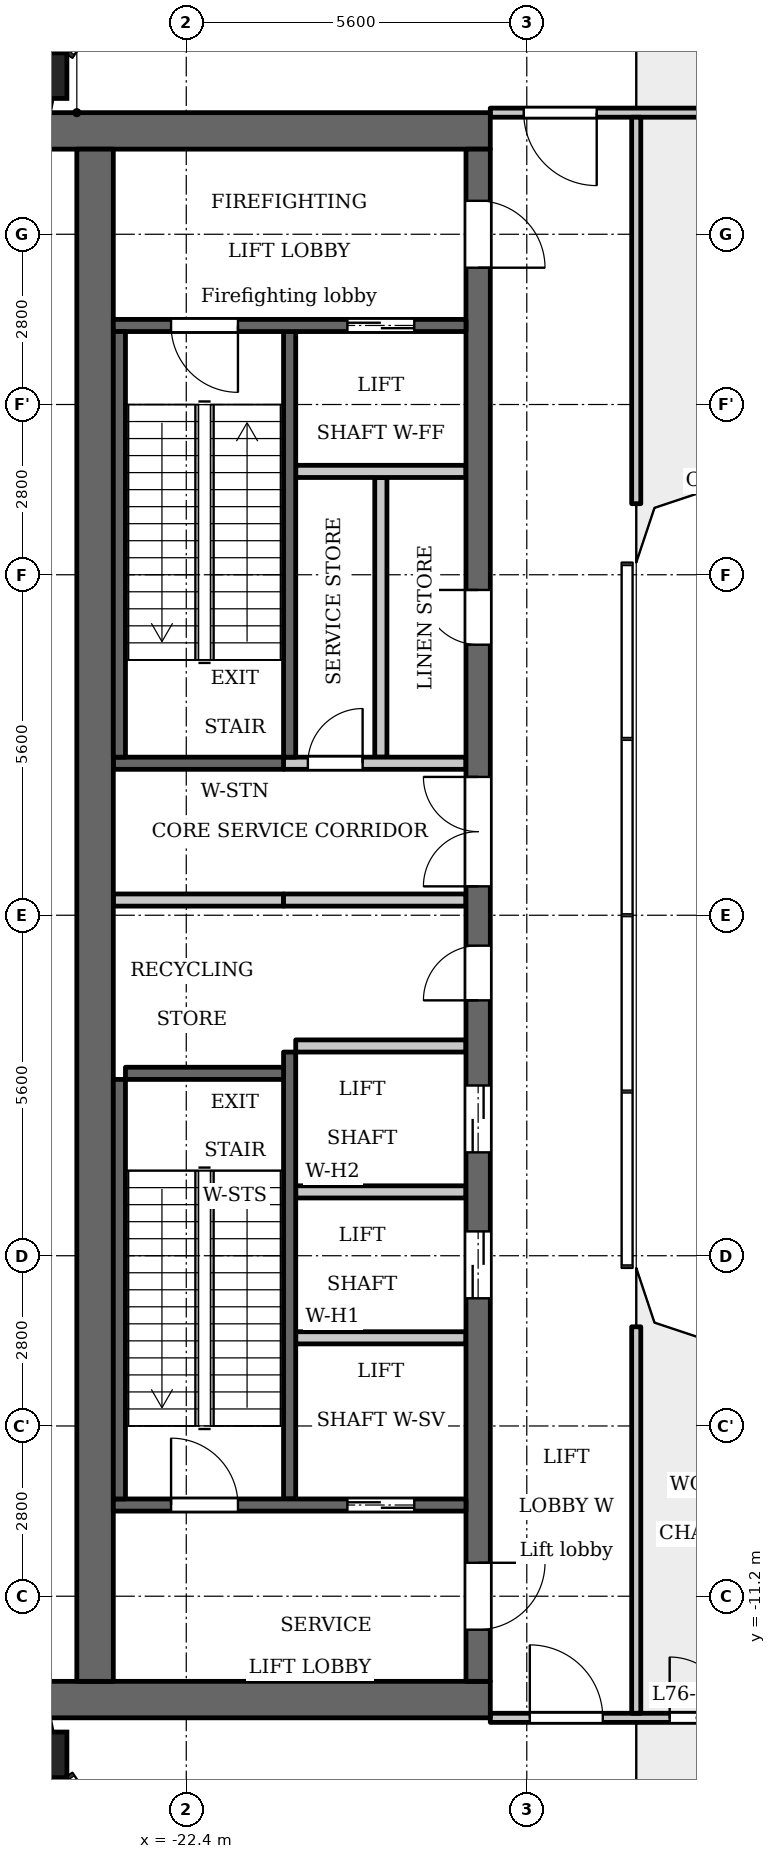
"""IFC4 building model, lengths in metres.
Left out: names, types, materials, properties, quantities, classifications, styles, units other than length and angle.
Written with IfcOpenShell. Run it as: python <this file> out.ifc"""

import sys

from ifc_helpers import new_model, si_unit, direction, frame, frame_2d, origin, origin_2d, place, context, subcontext, project, spatial, polyline, rectangle, outline, extrude, element, fill, save


model = new_model("IFC4")
c1 = context("Model", 3, precision=1e-05, world=origin(), true_north=direction((0.0, 1.0)))
c2 = subcontext(c1, "Body", "Model", "MODEL_VIEW")
j1 = project(units=[si_unit("LENGTHUNIT", "METRE"), si_unit("PLANEANGLEUNIT", "RADIAN")], contexts=[c1])
p1 = place(None, origin())
s1 = spatial("IfcSite", under=j1, at=p1, CompositionType="ELEMENT")
p2 = place(p1, origin())
s2 = spatial("IfcBuilding", under=s1, at=p2, CompositionType="ELEMENT")
p3 = place(p2, frame((0.0, 0.0, 294.5)))
s3 = spatial("IfcBuildingStorey", under=s2, at=p3, CompositionType="ELEMENT", Elevation=294.5)
for number, where, z_axis, x_axis in (
    (1, (-24.738, 13.809, 0.0), (0.0, 0.0, 1.0), (1.0, 0.0, 0.0)),
    (2, (-24.738, -13.809, 0.0), (0.0, 0.0, 1.0), (1.0, 0.0, 0.0)),
):
    element("IfcColumn", number, at=place(p3, frame(where, z_axis=z_axis, x_axis=x_axis)), inside=s3, PredefinedType="COLUMN", context=c2, shape_type="SweptSolid", body=[
        extrude(rectangle(XDim=0.75, YDim=0.75, at=origin_2d()), origin(), (0.0, 0.0, 1.0), 5.4),
    ])
p4 = place(p3, frame((-20.7, 2.6, 0.0), z_axis=(0.0, 0.0, 1.0), x_axis=(0.0, 1.0, 0.0)))
e3 = element("IfcWall", 3, at=p4, inside=s3, PredefinedType="SHEAR", context=c2, shape_type="SweptSolid", body=[
    extrude(rectangle(XDim=7.0, YDim=0.2, at=frame_2d((3.5, 0.0))), origin(), (0.0, 0.0, 1.0), 4.6),
])
p5 = place(p3, frame((-20.7, -9.6, 0.0), z_axis=(0.0, 0.0, 1.0), x_axis=(0.0, 1.0, 0.0)))
e4 = element("IfcWall", 4, at=p5, inside=s3, PredefinedType="SHEAR", context=c2, shape_type="SweptSolid", body=[
    extrude(rectangle(XDim=7.35, YDim=0.2, at=frame_2d((3.675, 0.0))), origin(), (0.0, 0.0, 1.0), 4.6),
])
p6 = place(p3, frame((-20.8, 2.5, 0.0), z_axis=(0.0, 0.0, 1.0), x_axis=(-1.0, 0.0, 0.0)))
e5 = element("IfcWall", 5, at=p6, inside=s3, PredefinedType="SHEAR", context=c2, shape_type="SweptSolid", body=[
    extrude(rectangle(XDim=2.8, YDim=0.2, at=frame_2d((1.4, 0.0))), origin(), (0.0, 0.0, 1.0), 4.6),
])
p7 = place(p3, frame((-20.8, 0.25, 0.0), z_axis=(0.0, 0.0, 1.0), x_axis=(-1.0, 0.0, 0.0)))
e6 = element("IfcWall", 6, at=p7, inside=s3, PredefinedType="PARTITIONING", context=c2, shape_type="SweptSolid", body=[
    extrude(rectangle(XDim=2.8, YDim=0.2, at=frame_2d((1.4, 0.0))), origin(), (0.0, 0.0, 1.0), 4.6),
])
for number, where, z_axis, x_axis in (
    (7, (-17.4, 12.9, 0.0), (0.0, 0.0, 1.0), (-1.0, 0.0, 0.0)),
    (8, (-17.4, -12.9, 0.0), (0.0, 0.0, 1.0), (-1.0, 0.0, 0.0)),
):
    element("IfcWall", number, at=place(p3, frame(where, z_axis=z_axis, x_axis=x_axis)), inside=s3, PredefinedType="SHEAR", context=c2, shape_type="SweptSolid", body=[
        extrude(rectangle(XDim=7.32, YDim=0.6, at=frame_2d((3.66, 0.0))), origin(), (0.0, 0.0, 1.0), 4.6),
    ])
p8 = place(p3, frame((-19.2, 2.6, 0.0), z_axis=(0.0, 0.0, 1.0), x_axis=(0.0, 1.0, 0.0)))
e9 = element("IfcWall", 9, at=p8, inside=s3, PredefinedType="PARTITIONING", context=c2, shape_type="SweptSolid", body=[
    extrude(rectangle(XDim=4.6, YDim=0.2, at=frame_2d((2.3, 0.0))), origin(), (0.0, 0.0, 1.0), 4.6),
])
p9 = place(p3, frame((-17.6, -12.6, 0.0), z_axis=(0.0, 0.0, 1.0), x_axis=(0.0, 1.0, 0.0)))
e10 = element("IfcWall", 10, at=p9, inside=s3, PredefinedType="SHEAR", context=c2, shape_type="SweptSolid", body=[
    extrude(rectangle(XDim=25.2, YDim=0.4, at=frame_2d((12.6, 0.0))), origin(), (0.0, 0.0, 1.0), 4.6),
])
p10 = place(p9, frame((6.3, 0.0, 0.0)))
e11 = element("IfcOpeningElement", 11, at=p10, cuts=e10, PredefinedType="OPENING", context=c2, shape_type="SweptSolid", body=[
    extrude(rectangle(XDim=1.1, YDim=2.1, at=frame_2d((0.55, 1.05))), frame((0.0, 0.21, 0.0), z_axis=(0.0, -1.0, 0.0), x_axis=(1.0, 0.0, 0.0)), (0.0, 0.0, 1.0), 0.42),
])
p11 = place(p9, frame((8.7, 0.0, 0.0)))
e12 = element("IfcOpeningElement", 12, at=p11, cuts=e10, PredefinedType="OPENING", context=c2, shape_type="SweptSolid", body=[
    extrude(rectangle(XDim=1.1, YDim=2.1, at=frame_2d((0.55, 1.05))), frame((0.0, 0.21, 0.0), z_axis=(0.0, -1.0, 0.0), x_axis=(1.0, 0.0, 0.0)), (0.0, 0.0, 1.0), 0.42),
])
p12 = place(p9, frame((11.2, 0.0, 0.0)))
e13 = element("IfcOpeningElement", 13, at=p12, cuts=e10, PredefinedType="OPENING", context=c2, shape_type="SweptSolid", body=[
    extrude(rectangle(XDim=0.9, YDim=2.1, at=frame_2d((0.45, 1.05))), frame((0.0, 0.21, 0.0), z_axis=(0.0, -1.0, 0.0), x_axis=(1.0, 0.0, 0.0)), (0.0, 0.0, 1.0), 0.42),
])
p13 = place(p9, frame((17.05, 0.0, 0.0)))
e14 = element("IfcOpeningElement", 14, at=p13, cuts=e10, PredefinedType="OPENING", context=c2, shape_type="SweptSolid", body=[
    extrude(rectangle(XDim=0.9, YDim=2.1, at=frame_2d((0.45, 1.05))), frame((0.0, 0.21, 0.0), z_axis=(0.0, -1.0, 0.0), x_axis=(1.0, 0.0, 0.0)), (0.0, 0.0, 1.0), 0.42),
])
p14 = place(p9, frame((23.25, 0.0, 0.0)))
e15 = element("IfcOpeningElement", 15, at=p14, cuts=e10, PredefinedType="OPENING", context=c2, shape_type="SweptSolid", body=[
    extrude(rectangle(XDim=1.1, YDim=2.1, at=frame_2d((0.55, 1.05))), frame((0.0, 0.21, 0.0), z_axis=(0.0, -1.0, 0.0), x_axis=(1.0, 0.0, 0.0)), (0.0, 0.0, 1.0), 0.42),
])
p15 = place(p9, frame((0.85, 0.0, 0.0)))
e16 = element("IfcOpeningElement", 16, at=p15, cuts=e10, PredefinedType="OPENING", context=c2, shape_type="SweptSolid", body=[
    extrude(rectangle(XDim=1.1, YDim=2.1, at=frame_2d((0.55, 1.05))), frame((0.0, 0.21, 0.0), z_axis=(0.0, -1.0, 0.0), x_axis=(1.0, 0.0, 0.0)), (0.0, 0.0, 1.0), 0.42),
])
p16 = place(p9, frame((13.075, 0.0, 0.0)))
e17 = element("IfcOpeningElement", 17, at=p16, cuts=e10, PredefinedType="OPENING", context=c2, shape_type="SweptSolid", body=[
    extrude(rectangle(XDim=1.8, YDim=2.1, at=frame_2d((0.9, 1.05))), frame((0.0, 0.21, 0.0), z_axis=(0.0, -1.0, 0.0), x_axis=(1.0, 0.0, 0.0)), (0.0, 0.0, 1.0), 0.42),
])
p17 = place(p3, frame((-23.9, -12.6, 0.0), z_axis=(0.0, 0.0, 1.0), x_axis=(0.0, 1.0, 0.0)))
e18 = element("IfcWall", 18, at=p17, inside=s3, PredefinedType="SHEAR", context=c2, shape_type="SweptSolid", body=[
    extrude(rectangle(XDim=25.2, YDim=0.6, at=frame_2d((12.6, 0.0))), origin(), (0.0, 0.0, 1.0), 4.6),
])
p18 = place(p3, frame((-17.8, -9.7, 0.0), z_axis=(0.0, 0.0, 1.0), x_axis=(-1.0, 0.0, 0.0)))
e19 = element("IfcWall", 19, at=p18, inside=s3, PredefinedType="SHEAR", context=c2, shape_type="SweptSolid", body=[
    extrude(rectangle(XDim=5.8, YDim=0.2, at=frame_2d((2.9, 0.0))), origin(), (0.0, 0.0, 1.0), 4.6),
])
p19 = place(p18, frame((0.85, 0.0, 0.0)))
e20 = element("IfcOpeningElement", 20, at=p19, cuts=e19, PredefinedType="OPENING", context=c2, shape_type="SweptSolid", body=[
    extrude(rectangle(XDim=1.1, YDim=2.1, at=frame_2d((0.55, 1.05))), frame((0.0, 0.11, 0.0), z_axis=(0.0, -1.0, 0.0), x_axis=(1.0, 0.0, 0.0)), (0.0, 0.0, 1.0), 0.22),
])
p20 = place(p18, frame((3.75, 0.0, 0.0)))
e21 = element("IfcOpeningElement", 21, at=p20, cuts=e19, PredefinedType="OPENING", context=c2, shape_type="SweptSolid", body=[
    extrude(rectangle(XDim=1.1, YDim=2.1, at=frame_2d((0.55, 1.05))), frame((0.0, 0.11, 0.0), z_axis=(0.0, -1.0, 0.0), x_axis=(1.0, 0.0, 0.0)), (0.0, 0.0, 1.0), 0.22),
])
for number, where, z_axis, x_axis in (
    (22, (-17.8, -6.95, 0.0), (0.0, 0.0, 1.0), (-1.0, 0.0, 0.0)),
    (23, (-17.8, -4.55, 0.0), (0.0, 0.0, 1.0), (-1.0, 0.0, 0.0)),
    (24, (-17.8, -2.15, 0.0), (0.0, 0.0, 1.0), (-1.0, 0.0, 0.0)),
):
    element("IfcWall", number, at=place(p3, frame(where, z_axis=z_axis, x_axis=x_axis)), inside=s3, PredefinedType="PARTITIONING", context=c2, shape_type="SweptSolid", body=[
        extrude(rectangle(XDim=2.8, YDim=0.2, at=frame_2d((1.4, 0.0))), origin(), (0.0, 0.0, 1.0), 4.6),
    ])
p21 = place(p3, frame((-17.8, 0.25, 0.0), z_axis=(0.0, 0.0, 1.0), x_axis=(-1.0, 0.0, 0.0)))
e25 = element("IfcWall", 25, at=p21, inside=s3, PredefinedType="PARTITIONING", context=c2, shape_type="SweptSolid", body=[
    extrude(rectangle(XDim=3.0, YDim=0.2, at=frame_2d((1.5, 0.0))), origin(), (0.0, 0.0, 1.0), 4.6),
])
p22 = place(p3, frame((-17.8, 2.5, 0.0), z_axis=(0.0, 0.0, 1.0), x_axis=(-1.0, 0.0, 0.0)))
e26 = element("IfcWall", 26, at=p22, inside=s3, PredefinedType="PARTITIONING", context=c2, shape_type="SweptSolid", body=[
    extrude(rectangle(XDim=3.0, YDim=0.2, at=frame_2d((1.5, 0.0))), origin(), (0.0, 0.0, 1.0), 4.6),
])
p23 = place(p22, frame((1.7, 0.0, 0.0)))
e27 = element("IfcOpeningElement", 27, at=p23, cuts=e26, PredefinedType="OPENING", context=c2, shape_type="SweptSolid", body=[
    extrude(rectangle(XDim=0.9, YDim=2.1, at=frame_2d((0.45, 1.05))), frame((0.0, 0.11, 0.0), z_axis=(0.0, -1.0, 0.0), x_axis=(1.0, 0.0, 0.0)), (0.0, 0.0, 1.0), 0.22),
])
p24 = place(p3, frame((-17.8, 7.3, 0.0), z_axis=(0.0, 0.0, 1.0), x_axis=(-1.0, 0.0, 0.0)))
e28 = element("IfcWall", 28, at=p24, inside=s3, PredefinedType="PARTITIONING", context=c2, shape_type="SweptSolid", body=[
    extrude(rectangle(XDim=2.8, YDim=0.2, at=frame_2d((1.4, 0.0))), origin(), (0.0, 0.0, 1.0), 4.6),
])
p25 = place(p3, frame((-17.8, 9.7, 0.0), z_axis=(0.0, 0.0, 1.0), x_axis=(-1.0, 0.0, 0.0)))
e29 = element("IfcWall", 29, at=p25, inside=s3, PredefinedType="SHEAR", context=c2, shape_type="SweptSolid", body=[
    extrude(rectangle(XDim=5.8, YDim=0.2, at=frame_2d((2.9, 0.0))), origin(), (0.0, 0.0, 1.0), 4.6),
])
p26 = place(p25, frame((0.85, 0.0, 0.0)))
e30 = element("IfcOpeningElement", 30, at=p26, cuts=e29, PredefinedType="OPENING", context=c2, shape_type="SweptSolid", body=[
    extrude(rectangle(XDim=1.1, YDim=2.1, at=frame_2d((0.55, 1.05))), frame((0.0, 0.11, 0.0), z_axis=(0.0, -1.0, 0.0), x_axis=(1.0, 0.0, 0.0)), (0.0, 0.0, 1.0), 0.22),
])
p27 = place(p25, frame((3.75, 0.0, 0.0)))
e31 = element("IfcOpeningElement", 31, at=p27, cuts=e29, PredefinedType="OPENING", context=c2, shape_type="SweptSolid", body=[
    extrude(rectangle(XDim=1.1, YDim=2.1, at=frame_2d((0.55, 1.05))), frame((0.0, 0.11, 0.0), z_axis=(0.0, -1.0, 0.0), x_axis=(1.0, 0.0, 0.0)), (0.0, 0.0, 1.0), 0.22),
])
p28 = place(p3, frame((-23.5, 2.6, 0.0), z_axis=(0.0, 0.0, 1.0), x_axis=(0.0, 1.0, 0.0)))
e32 = element("IfcWall", 32, at=p28, inside=s3, PredefinedType="SHEAR", context=c2, shape_type="SweptSolid", body=[
    extrude(rectangle(XDim=7.0, YDim=0.2, at=frame_2d((3.5, 0.0))), origin(), (0.0, 0.0, 1.0), 4.6),
])
p29 = place(p3, frame((-23.5, -9.6, 0.0), z_axis=(0.0, 0.0, 1.0), x_axis=(0.0, 1.0, 0.0)))
e33 = element("IfcWall", 33, at=p29, inside=s3, PredefinedType="SHEAR", context=c2, shape_type="SweptSolid", body=[
    extrude(rectangle(XDim=6.9, YDim=0.2, at=frame_2d((3.45, 0.0))), origin(), (0.0, 0.0, 1.0), 4.6),
])
p30 = place(p3, frame((-20.8, -2.6, 0.0), z_axis=(0.0, 0.0, 1.0), x_axis=(-1.0, 0.0, 0.0)))
e34 = element("IfcWall", 34, at=p30, inside=s3, PredefinedType="SHEAR", context=c2, shape_type="SweptSolid", body=[
    extrude(rectangle(XDim=2.6, YDim=0.2, at=frame_2d((1.3, 0.0))), origin(), (0.0, 0.0, 1.0), 4.6),
])
p31 = place(p3, frame((-17.4, -13.2, 0.0), z_axis=(0.0, 0.0, 1.0), x_axis=(1.0, 0.0, 0.0)))
e35 = element("IfcWall", 35, at=p31, inside=s3, PredefinedType="PARTITIONING", context=c2, shape_type="SweptSolid", body=[
    extrude(rectangle(XDim=34.8, YDim=0.15, at=frame_2d((17.4, 0.0))), origin(), (0.0, 0.0, 1.0), 4.6),
])
p32 = place(p31, frame((0.65, 0.0, 0.0)))
e36 = element("IfcOpeningElement", 36, at=p32, cuts=e35, PredefinedType="OPENING", context=c2, shape_type="SweptSolid", body=[
    extrude(rectangle(XDim=1.2, YDim=2.1, at=frame_2d((0.6, 1.05))), frame((0.0, 0.085, 0.0), z_axis=(0.0, -1.0, 0.0), x_axis=(1.0, 0.0, 0.0)), (0.0, 0.0, 1.0), 0.17),
])
p33 = place(p31, frame((2.95, 0.0, 0.0)))
e37 = element("IfcOpeningElement", 37, at=p33, cuts=e35, PredefinedType="OPENING", context=c2, shape_type="SweptSolid", body=[
    extrude(rectangle(XDim=1.0, YDim=2.1, at=frame_2d((0.5, 1.05))), frame((0.0, 0.085, 0.0), z_axis=(0.0, -1.0, 0.0), x_axis=(1.0, 0.0, 0.0)), (0.0, 0.0, 1.0), 0.17),
])
p34 = place(p31, frame((24.75, 0.0, 0.0)))
e38 = element("IfcOpeningElement", 38, at=p34, cuts=e35, PredefinedType="OPENING", context=c2, shape_type="SweptSolid", body=[
    extrude(rectangle(XDim=1.8, YDim=2.1, at=frame_2d((0.9, 1.05))), frame((0.0, 0.085, 0.0), z_axis=(0.0, -1.0, 0.0), x_axis=(1.0, 0.0, 0.0)), (0.0, 0.0, 1.0), 0.17),
])
p35 = place(p31, frame((27.75, 0.0, 0.0)))
e39 = element("IfcOpeningElement", 39, at=p35, cuts=e35, PredefinedType="OPENING", context=c2, shape_type="SweptSolid", body=[
    extrude(rectangle(XDim=1.0, YDim=2.1, at=frame_2d((0.5, 1.05))), frame((0.0, 0.085, 0.0), z_axis=(0.0, -1.0, 0.0), x_axis=(1.0, 0.0, 0.0)), (0.0, 0.0, 1.0), 0.17),
])
p36 = place(p3, frame((-17.4, 13.2, 0.0), z_axis=(0.0, 0.0, 1.0), x_axis=(1.0, 0.0, 0.0)))
e40 = element("IfcWall", 40, at=p36, inside=s3, PredefinedType="PARTITIONING", context=c2, shape_type="SweptSolid", body=[
    extrude(rectangle(XDim=34.8, YDim=0.15, at=frame_2d((17.4, 0.0))), origin(), (0.0, 0.0, 1.0), 4.6),
])
p37 = place(p36, frame((0.55, 0.0, 0.0)))
e41 = element("IfcOpeningElement", 41, at=p37, cuts=e40, PredefinedType="OPENING", context=c2, shape_type="SweptSolid", body=[
    extrude(rectangle(XDim=1.2, YDim=2.1, at=frame_2d((0.6, 1.05))), frame((0.0, 0.085, 0.0), z_axis=(0.0, -1.0, 0.0), x_axis=(1.0, 0.0, 0.0)), (0.0, 0.0, 1.0), 0.17),
])
p38 = place(p36, frame((15.05, 0.0, 0.0)))
e42 = element("IfcOpeningElement", 42, at=p38, cuts=e40, PredefinedType="OPENING", context=c2, shape_type="SweptSolid", body=[
    extrude(rectangle(XDim=1.8, YDim=2.1, at=frame_2d((0.9, 1.05))), frame((0.0, 0.085, 0.0), z_axis=(0.0, -1.0, 0.0), x_axis=(1.0, 0.0, 0.0)), (0.0, 0.0, 1.0), 0.17),
])
p39 = place(p36, frame((18.05, 0.0, 0.0)))
e43 = element("IfcOpeningElement", 43, at=p39, cuts=e40, PredefinedType="OPENING", context=c2, shape_type="SweptSolid", body=[
    extrude(rectangle(XDim=1.0, YDim=2.1, at=frame_2d((0.5, 1.05))), frame((0.0, 0.085, 0.0), z_axis=(0.0, -1.0, 0.0), x_axis=(1.0, 0.0, 0.0)), (0.0, 0.0, 1.0), 0.17),
])
for number, where, z_axis, x_axis in (
    (44, (-15.0, -13.125, 0.0), (0.0, 0.0, 1.0), (0.0, 1.0, 0.0)),
    (45, (-15.0, 6.769, 0.0), (0.0, 0.0, 1.0), (0.0, 1.0, 0.0)),
):
    element("IfcWall", number, at=place(p3, frame(where, z_axis=z_axis, x_axis=x_axis)), inside=s3, PredefinedType="PARTITIONING", context=c2, shape_type="SweptSolid", body=[
        extrude(rectangle(XDim=6.356, YDim=0.15, at=frame_2d((3.178, 0.0))), origin(), (0.0, 0.0, 1.0), 4.6),
    ])
p40 = place(p3, origin())
e46 = element("IfcWall", 46, at=p40, inside=s3, PredefinedType="SOLIDWALL", context=c2, shape_type="SweptSolid", body=[
    extrude(outline(polyline([(-13.849, 7.3), (-14.937, 6.937), (-15.3, 5.849), (-15.3, 5.8), (-15.0, 5.8), (-14.7, 6.7), (-13.8, 7.0), (-13.8, 7.3), (-13.849, 7.3)])), origin(), (0.0, 0.0, 1.0), 4.6),
])
e47 = element("IfcWall", 47, at=p40, inside=s3, PredefinedType="SOLIDWALL", context=c2, shape_type="SweptSolid", body=[
    extrude(outline(polyline([(-14.937, -6.937), (-13.849, -7.3), (-13.8, -7.3), (-13.8, -7.0), (-14.7, -6.7), (-15.0, -5.8), (-15.3, -5.8), (-15.3, -5.849), (-14.937, -6.937)])), origin(), (0.0, 0.0, 1.0), 4.6),
])
p41 = place(p19, origin())
e48 = element("IfcDoor", 48, at=p41, inside=s3, OperationType="DOUBLE_DOOR_SLIDING", PredefinedType="DOOR", context=c2, shape_type="SweptSolid", body=[
    extrude(rectangle(XDim=1.1, YDim=2.1, at=frame_2d((0.55, 1.05))), frame((0.0, 0.025, 0.0), z_axis=(0.0, -1.0, 0.0), x_axis=(1.0, 0.0, 0.0)), (0.0, 0.0, 1.0), 0.05),
])
fill(e20, e48)
p42 = place(p10, origin())
e49 = element("IfcDoor", 49, at=p42, inside=s3, OperationType="DOUBLE_DOOR_SLIDING", PredefinedType="DOOR", context=c2, shape_type="SweptSolid", body=[
    extrude(rectangle(XDim=1.1, YDim=2.1, at=frame_2d((0.55, 1.05))), frame((0.0, 0.025, 0.0), z_axis=(0.0, -1.0, 0.0), x_axis=(1.0, 0.0, 0.0)), (0.0, 0.0, 1.0), 0.05),
])
fill(e11, e49)
p43 = place(p11, origin())
e50 = element("IfcDoor", 50, at=p43, inside=s3, OperationType="DOUBLE_DOOR_SLIDING", PredefinedType="DOOR", context=c2, shape_type="SweptSolid", body=[
    extrude(rectangle(XDim=1.1, YDim=2.1, at=frame_2d((0.55, 1.05))), frame((0.0, 0.025, 0.0), z_axis=(0.0, -1.0, 0.0), x_axis=(1.0, 0.0, 0.0)), (0.0, 0.0, 1.0), 0.05),
])
fill(e12, e50)
p44 = place(p12, origin())
e51 = element("IfcDoor", 51, at=p44, inside=s3, OperationType="SINGLE_SWING_RIGHT", PredefinedType="DOOR", context=c2, shape_type="SweptSolid", body=[
    extrude(rectangle(XDim=0.9, YDim=2.1, at=frame_2d((0.45, 1.05))), frame((0.0, 0.025, 0.0), z_axis=(0.0, -1.0, 0.0), x_axis=(1.0, 0.0, 0.0)), (0.0, 0.0, 1.0), 0.05),
])
fill(e13, e51)
p45 = place(p13, origin())
e52 = element("IfcDoor", 52, at=p45, inside=s3, OperationType="SINGLE_SWING_LEFT", PredefinedType="DOOR", context=c2, shape_type="SweptSolid", body=[
    extrude(rectangle(XDim=0.9, YDim=2.1, at=frame_2d((0.45, 1.05))), frame((0.0, 0.025, 0.0), z_axis=(0.0, -1.0, 0.0), x_axis=(1.0, 0.0, 0.0)), (0.0, 0.0, 1.0), 0.05),
])
fill(e14, e52)
p46 = place(p23, origin())
e53 = element("IfcDoor", 53, at=p46, inside=s3, OperationType="SINGLE_SWING_LEFT", PredefinedType="DOOR", context=c2, shape_type="SweptSolid", body=[
    extrude(rectangle(XDim=0.9, YDim=2.1, at=frame_2d((0.45, 1.05))), frame((0.0, 0.025, 0.0), z_axis=(0.0, -1.0, 0.0), x_axis=(1.0, 0.0, 0.0)), (0.0, 0.0, 1.0), 0.05),
])
fill(e27, e53)
p47 = place(p26, origin())
e54 = element("IfcDoor", 54, at=p47, inside=s3, OperationType="DOUBLE_DOOR_SLIDING", PredefinedType="DOOR", context=c2, shape_type="SweptSolid", body=[
    extrude(rectangle(XDim=1.1, YDim=2.1, at=frame_2d((0.55, 1.05))), frame((0.0, 0.025, 0.0), z_axis=(0.0, -1.0, 0.0), x_axis=(1.0, 0.0, 0.0)), (0.0, 0.0, 1.0), 0.05),
])
fill(e30, e54)
p48 = place(p14, origin())
e55 = element("IfcDoor", 55, at=p48, inside=s3, OperationType="SINGLE_SWING_LEFT", PredefinedType="DOOR", context=c2, shape_type="SweptSolid", body=[
    extrude(rectangle(XDim=1.1, YDim=2.1, at=frame_2d((0.55, 1.05))), frame((0.0, 0.025, 0.0), z_axis=(0.0, -1.0, 0.0), x_axis=(1.0, 0.0, 0.0)), (0.0, 0.0, 1.0), 0.05),
])
fill(e15, e55)
p49 = place(p15, origin())
e56 = element("IfcDoor", 56, at=p49, inside=s3, OperationType="SINGLE_SWING_RIGHT", PredefinedType="DOOR", context=c2, shape_type="SweptSolid", body=[
    extrude(rectangle(XDim=1.1, YDim=2.1, at=frame_2d((0.55, 1.05))), frame((0.0, 0.025, 0.0), z_axis=(0.0, -1.0, 0.0), x_axis=(1.0, 0.0, 0.0)), (0.0, 0.0, 1.0), 0.05),
])
fill(e16, e56)
p50 = place(p27, origin())
e57 = element("IfcDoor", 57, at=p50, inside=s3, OperationType="SINGLE_SWING_RIGHT", PredefinedType="DOOR", context=c2, shape_type="SweptSolid", body=[
    extrude(rectangle(XDim=1.1, YDim=2.1, at=frame_2d((0.55, 1.05))), frame((0.0, 0.025, 0.0), z_axis=(0.0, -1.0, 0.0), x_axis=(1.0, 0.0, 0.0)), (0.0, 0.0, 1.0), 0.05),
])
fill(e31, e57)
p51 = place(p20, origin())
e58 = element("IfcDoor", 58, at=p51, inside=s3, OperationType="SINGLE_SWING_RIGHT", PredefinedType="DOOR", context=c2, shape_type="SweptSolid", body=[
    extrude(rectangle(XDim=1.1, YDim=2.1, at=frame_2d((0.55, 1.05))), frame((0.0, 0.025, 0.0), z_axis=(0.0, -1.0, 0.0), x_axis=(1.0, 0.0, 0.0)), (0.0, 0.0, 1.0), 0.05),
])
fill(e21, e58)
p52 = place(p16, origin())
e59 = element("IfcDoor", 59, at=p52, inside=s3, OperationType="DOUBLE_DOOR_SINGLE_SWING", PredefinedType="DOOR", context=c2, shape_type="SweptSolid", body=[
    extrude(rectangle(XDim=1.8, YDim=2.1, at=frame_2d((0.9, 1.05))), frame((0.0, 0.025, 0.0), z_axis=(0.0, -1.0, 0.0), x_axis=(1.0, 0.0, 0.0)), (0.0, 0.0, 1.0), 0.05),
])
fill(e17, e59)
p53 = place(p37, origin())
e60 = element("IfcDoor", 60, at=p53, inside=s3, OperationType="SINGLE_SWING_RIGHT", PredefinedType="DOOR", context=c2, shape_type="SweptSolid", body=[
    extrude(rectangle(XDim=1.2, YDim=2.1, at=frame_2d((0.6, 1.05))), frame((0.0, 0.025, 0.0), z_axis=(0.0, -1.0, 0.0), x_axis=(1.0, 0.0, 0.0)), (0.0, 0.0, 1.0), 0.05),
])
fill(e41, e60)
p54 = place(p32, origin())
e61 = element("IfcDoor", 61, at=p54, inside=s3, OperationType="SINGLE_SWING_RIGHT", PredefinedType="DOOR", context=c2, shape_type="SweptSolid", body=[
    extrude(rectangle(XDim=1.2, YDim=2.1, at=frame_2d((0.6, 1.05))), frame((0.0, 0.025, 0.0), z_axis=(0.0, -1.0, 0.0), x_axis=(1.0, 0.0, 0.0)), (0.0, 0.0, 1.0), 0.05),
])
fill(e36, e61)
p55 = place(p33, origin())
e62 = element("IfcDoor", 62, at=p55, inside=s3, OperationType="SINGLE_SWING_RIGHT", PredefinedType="DOOR", context=c2, shape_type="SweptSolid", body=[
    extrude(rectangle(XDim=1.0, YDim=2.1, at=frame_2d((0.5, 1.05))), frame((0.0, 0.025, 0.0), z_axis=(0.0, -1.0, 0.0), x_axis=(1.0, 0.0, 0.0)), (0.0, 0.0, 1.0), 0.05),
])
fill(e37, e62)
save(model, sys.argv[1])
